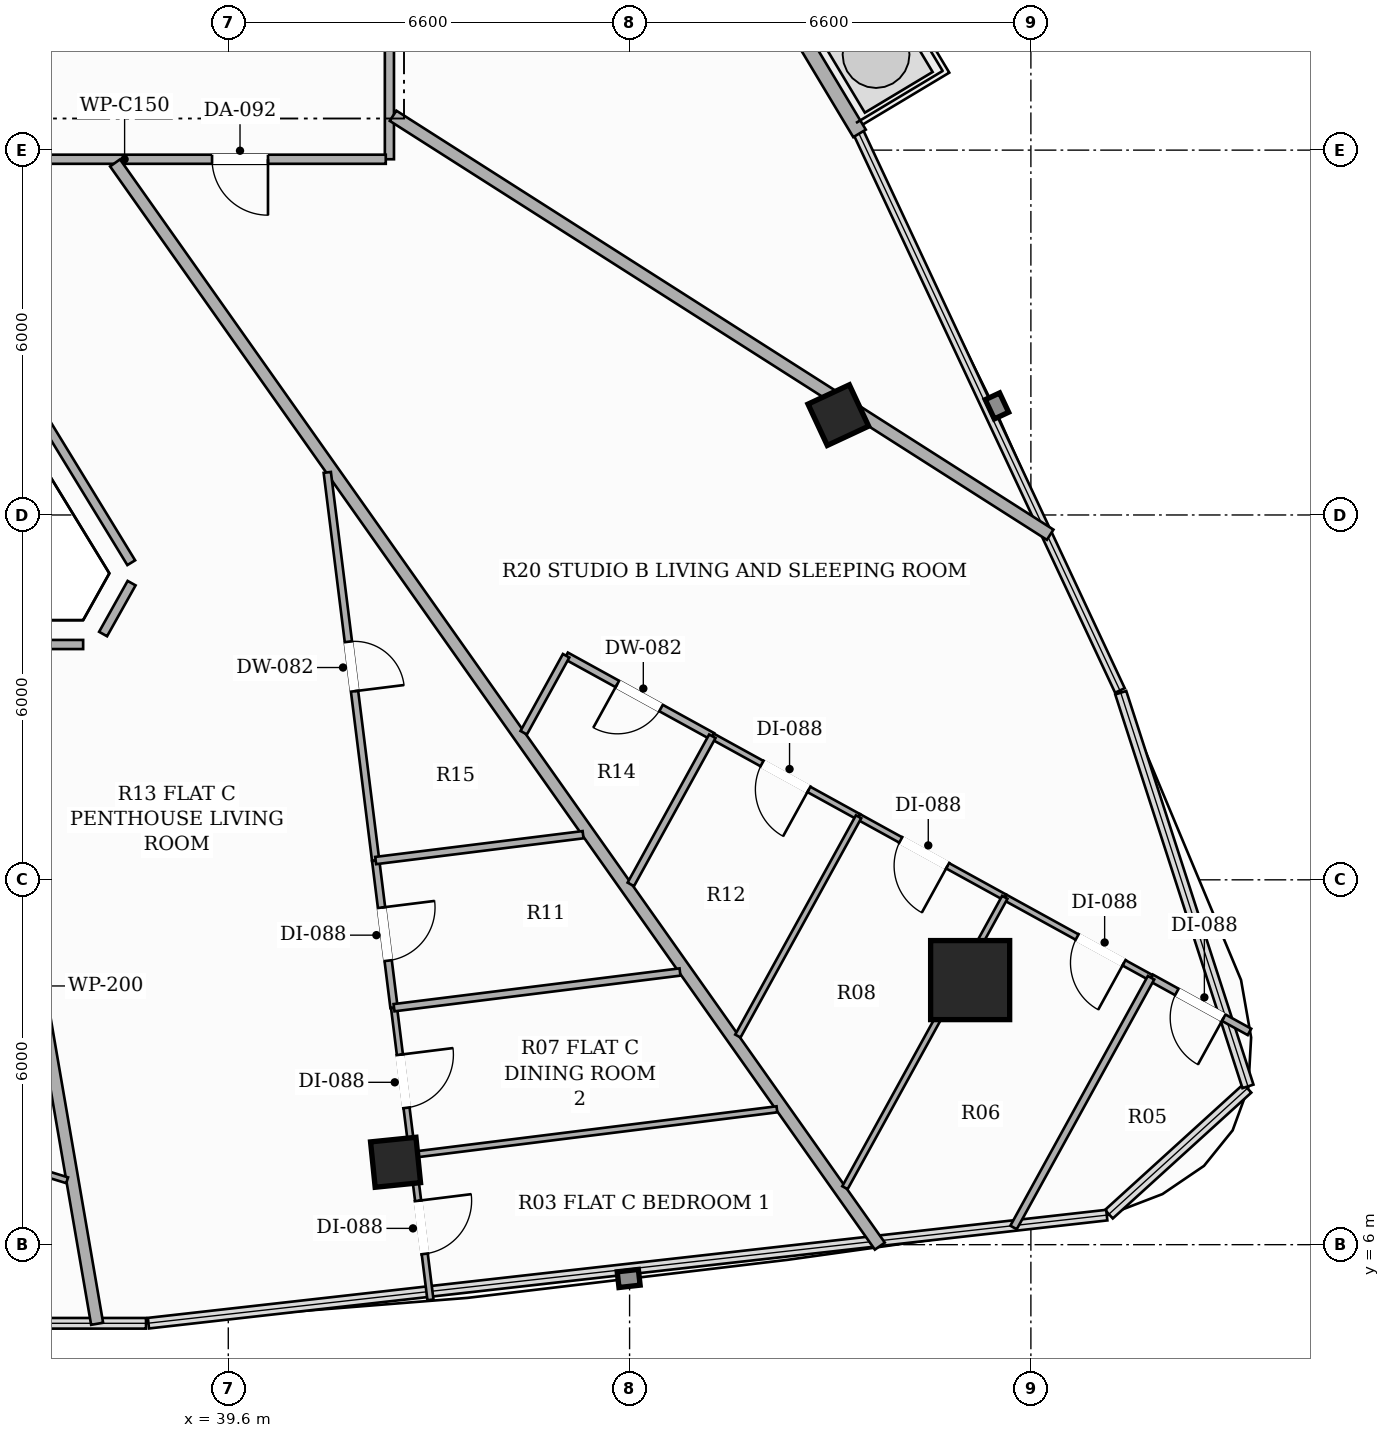
"""IFC4 building model, lengths in metres.
Left out: names, types, materials, properties, quantities, classifications, styles, units other than length and angle.
Written with IfcOpenShell. Run it as: python <this file> out.ifc"""

import sys

from ifc_helpers import new_model, si_unit, direction, frame, frame_2d, origin, origin_2d, place, context, subcontext, project, spatial, rectangle, hollow_rectangle, extrude, element, fill, save


model = new_model("IFC4")
c1 = context("Model", 3, precision=1e-05, world=origin(), true_north=direction((0.0, 1.0)))
c2 = subcontext(c1, "Body", "Model", "MODEL_VIEW")
j1 = project(units=[si_unit("LENGTHUNIT", "METRE"), si_unit("PLANEANGLEUNIT", "RADIAN")], contexts=[c1])
p1 = place(None, origin())
s1 = spatial("IfcSite", under=j1, at=p1, CompositionType="ELEMENT")
p2 = place(p1, origin())
s2 = spatial("IfcBuilding", under=s1, at=p2, CompositionType="ELEMENT")
p3 = place(p2, frame((0.0, 0.0, 206.3)))
s3 = spatial("IfcBuildingStorey", under=s2, at=p3, CompositionType="ELEMENT", Elevation=206.3)
p4 = place(p3, frame((51.801, 10.351, 0.0), z_axis=(0.0, 0.0, 1.0), x_axis=(1.0, 0.0, 0.0)))
e1 = element("IfcColumn", 1, at=p4, inside=s3, PredefinedType="COLUMN", context=c2, shape_type="SweptSolid", body=[
    extrude(hollow_rectangle(XDim=1.3, YDim=1.3, WallThickness=0.04, at=origin_2d()), origin(), (0.0, 0.0, 1.0), 3.3),
])
for number, where, z_axis, x_axis in (
    (2, (42.351, 7.355, 0.0), (0.0, 0.0, 1.0), (0.995, 0.101, 0.0)),
    (3, (49.633, 19.642, 0.0), (0.0, 0.0, 1.0), (-0.423, 0.906, 0.0)),
):
    element("IfcColumn", number, at=place(p3, frame(where, z_axis=z_axis, x_axis=x_axis)), inside=s3, PredefinedType="COLUMN", context=c2, shape_type="SweptSolid", body=[
        extrude(hollow_rectangle(XDim=0.75, YDim=0.75, WallThickness=0.025, at=origin_2d()), origin(), (0.0, 0.0, 1.0), 3.3),
    ])
p5 = place(p3, frame((49.982, 24.275, 0.0), z_axis=(0.0, 0.0, 1.0), x_axis=(-0.514391899557, 0.857555230682, 0.0)))
e4 = element("IfcWall", 4, at=p5, inside=s3, PredefinedType="SOLIDWALL", context=c2, shape_type="SweptSolid", body=[
    extrude(rectangle(XDim=10.371, YDim=0.24, at=frame_2d((5.186, 0.0))), origin(), (0.0, 0.0, 1.0), 2.624),
])
p6 = place(p5, frame((7.874, 0.0, 0.0)))
e5 = element("IfcOpeningElement", 5, at=p6, cuts=e4, PredefinedType="OPENING", context=c2, shape_type="SweptSolid", body=[
    extrude(rectangle(XDim=1.8, YDim=2.2, at=frame_2d((0.9, 1.1))), frame((0.0, 0.13, 0.0), z_axis=(0.0, -1.0, 0.0), x_axis=(1.0, 0.0, 0.0)), (0.0, 0.0, 1.0), 0.26),
])
p7 = place(p3, frame((42.25, 26.59, 0.0), z_axis=(0.0, 0.0, 1.0), x_axis=(0.0, -1.0, 0.0)))
e6 = element("IfcWall", 6, at=p7, inside=s3, PredefinedType="PARTITIONING", context=c2, shape_type="SweptSolid", body=[
    extrude(rectangle(XDim=2.74, YDim=0.15, at=frame_2d((1.37, 0.0))), origin(), (0.0, 0.0, 1.0), 2.773),
])
p8 = place(p3, frame((42.19, 23.85, 0.0), z_axis=(0.0, 0.0, 1.0), x_axis=(-1.0, 0.0, 0.0)))
e7 = element("IfcWall", 7, at=p8, inside=s3, PredefinedType="PARTITIONING", context=c2, shape_type="SweptSolid", body=[
    extrude(rectangle(XDim=8.24, YDim=0.15, at=frame_2d((4.12, 0.0))), origin(), (0.0, 0.0, 1.0), 2.565),
])
p9 = place(p8, frame((1.937, 0.0, 0.0)))
e8 = element("IfcOpeningElement", 8, at=p9, cuts=e7, PredefinedType="OPENING", context=c2, shape_type="SweptSolid", body=[
    extrude(rectangle(XDim=0.92, YDim=2.15, at=frame_2d((0.46, 1.075))), frame((0.0, 0.085, 0.0), z_axis=(0.0, -1.0, 0.0), x_axis=(1.0, 0.0, 0.0)), (0.0, 0.0, 1.0), 0.17),
])
p10 = place(p8, frame((5.733, 0.0, 0.0)))
e9 = element("IfcOpeningElement", 9, at=p10, cuts=e7, PredefinedType="OPENING", context=c2, shape_type="SweptSolid", body=[
    extrude(rectangle(XDim=0.92, YDim=2.15, at=frame_2d((0.46, 1.075))), frame((0.0, 0.085, 0.0), z_axis=(0.0, -1.0, 0.0), x_axis=(1.0, 0.0, 0.0)), (0.0, 0.0, 1.0), 0.17),
])
p11 = place(p3, frame((33.987, 23.79, 0.0), z_axis=(0.0, 0.0, 1.0), x_axis=(0.521338496894, -0.853349970209, 0.0)))
e10 = element("IfcWall", 10, at=p11, inside=s3, PredefinedType="PARTITIONING", context=c2, shape_type="SweptSolid", body=[
    extrude(rectangle(XDim=7.705, YDim=0.15, at=frame_2d((3.853, 0.0))), origin(), (0.0, 0.0, 1.0), 2.773),
])
p12 = place(p3, frame((38.01, 16.879, 0.0), z_axis=(0.0, 0.0, 1.0), x_axis=(-0.488859069364, -0.872362774481, 0.0)))
e11 = element("IfcWall", 11, at=p12, inside=s3, PredefinedType="PARTITIONING", context=c2, shape_type="SweptSolid", body=[
    extrude(rectangle(XDim=0.959, YDim=0.15, at=frame_2d((0.48, 0.0))), origin(), (0.0, 0.0, 1.0), 3.06),
])
p13 = place(p3, frame((37.213, 15.87, 0.0), z_axis=(0.0, 0.0, 1.0), x_axis=(-1.0, 0.0, 0.0)))
e12 = element("IfcWall", 12, at=p13, inside=s3, PredefinedType="PARTITIONING", context=c2, shape_type="SweptSolid", body=[
    extrude(rectangle(XDim=8.426, YDim=0.15, at=frame_2d((4.213, 0.0))), origin(), (0.0, 0.0, 1.0), 2.773),
])
p14 = place(p3, frame((35.53, 15.81, 0.0), z_axis=(0.0, 0.0, 1.0), x_axis=(0.169681394536, -0.985498972272, 0.0)))
e13 = element("IfcWall", 13, at=p14, inside=s3, PredefinedType="PARTITIONING", context=c2, shape_type="SweptSolid", body=[
    extrude(rectangle(XDim=11.275, YDim=0.2, at=frame_2d((5.637, 0.0))), origin(), (0.0, 0.0, 1.0), 2.492),
])
p15 = place(p3, frame((50.316, 5.976, 0.0), z_axis=(0.0, 0.0, 1.0), x_axis=(-0.576784728977, 0.816896184603, 0.0)))
e14 = element("IfcWall", 14, at=p15, inside=s3, PredefinedType="PARTITIONING", context=c2, shape_type="SweptSolid", body=[
    extrude(rectangle(XDim=21.807, YDim=0.2, at=frame_2d((10.903, 0.0))), origin(), (0.0, 0.0, 1.0), 2.492),
])
p16 = place(p3, frame((42.31, 24.565, 0.0), z_axis=(0.0, 0.0, 1.0), x_axis=(0.843209388644, -0.537585274075, 0.0)))
e15 = element("IfcWall", 15, at=p16, inside=s3, PredefinedType="PARTITIONING", context=c2, shape_type="SweptSolid", body=[
    extrude(rectangle(XDim=12.816, YDim=0.2, at=frame_2d((6.408, 0.0))), origin(), (0.0, 0.0, 1.0), 2.492),
])
p17 = place(p3, frame((29.459, 9.37, 0.0), z_axis=(0.0, 0.0, 1.0), x_axis=(0.955559226726, -0.294799193044, 0.0)))
e16 = element("IfcWall", 16, at=p17, inside=s3, PredefinedType="PARTITIONING", context=c2, shape_type="SweptSolid", body=[
    extrude(rectangle(XDim=7.839, YDim=0.1, at=frame_2d((3.92, 0.0))), origin(), (0.0, 0.0, 1.0), 2.492),
])
p18 = place(p3, frame((47.561, 14.361, 0.0), z_axis=(0.0, 0.0, 1.0), x_axis=(-0.876029965154, 0.482256674554, 0.0)))
e17 = element("IfcWall", 17, at=p18, inside=s3, PredefinedType="PARTITIONING", context=c2, shape_type="SweptSolid", body=[
    extrude(rectangle(XDim=2.745, YDim=0.12, at=frame_2d((1.373, 0.0))), origin(), (0.0, 0.0, 1.0), 3.06),
])
p19 = place(p18, frame((0.963, 0.0, 0.0)))
e18 = element("IfcOpeningElement", 18, at=p19, cuts=e17, PredefinedType="OPENING", context=c2, shape_type="SweptSolid", body=[
    extrude(rectangle(XDim=0.82, YDim=2.1, at=frame_2d((0.41, 1.05))), frame((0.0, 0.07, 0.0), z_axis=(0.0, -1.0, 0.0), x_axis=(1.0, 0.0, 0.0)), (0.0, 0.0, 1.0), 0.14),
])
p20 = place(p3, frame((45.156, 15.685, 0.0), z_axis=(0.0, 0.0, 1.0), x_axis=(-0.482268873401, -0.876023249548, 0.0)))
e19 = element("IfcWall", 19, at=p20, inside=s3, PredefinedType="PARTITIONING", context=c2, shape_type="SweptSolid", body=[
    extrude(rectangle(XDim=1.445, YDim=0.12, at=frame_2d((0.723, 0.0))), origin(), (0.0, 0.0, 1.0), 2.773),
])
p21 = place(p3, frame((56.395, 9.499, 0.0), z_axis=(0.0, 0.0, 1.0), x_axis=(-0.876137798995, 0.482060740128, 0.0)))
e20 = element("IfcWall", 20, at=p21, inside=s3, PredefinedType="PARTITIONING", context=c2, shape_type="SweptSolid", body=[
    extrude(rectangle(XDim=1.848, YDim=0.12, at=frame_2d((0.924, 0.0))), origin(), (0.0, 0.0, 1.0), 3.06),
])
p22 = place(p21, frame((0.484, 0.0, 0.0)))
e21 = element("IfcOpeningElement", 21, at=p22, cuts=e20, PredefinedType="OPENING", context=c2, shape_type="SweptSolid", body=[
    extrude(rectangle(XDim=0.88, YDim=2.1, at=frame_2d((0.44, 1.05))), frame((0.0, 0.07, 0.0), z_axis=(0.0, -1.0, 0.0), x_axis=(1.0, 0.0, 0.0)), (0.0, 0.0, 1.0), 0.14),
])
p23 = place(p3, frame((54.776, 10.39, 0.0), z_axis=(0.0, 0.0, 1.0), x_axis=(-0.876159561865, 0.48202118434, 0.0)))
e22 = element("IfcWall", 22, at=p23, inside=s3, PredefinedType="PARTITIONING", context=c2, shape_type="SweptSolid", body=[
    extrude(rectangle(XDim=2.745, YDim=0.1, at=frame_2d((1.372, 0.0))), origin(), (0.0, 0.0, 1.0), 3.06),
])
p24 = place(p23, frame((0.508, 0.0, 0.0)))
e23 = element("IfcOpeningElement", 23, at=p24, cuts=e22, PredefinedType="OPENING", context=c2, shape_type="SweptSolid", body=[
    extrude(rectangle(XDim=0.88, YDim=2.1, at=frame_2d((0.44, 1.05))), frame((0.0, 0.06, 0.0), z_axis=(0.0, -1.0, 0.0), x_axis=(1.0, 0.0, 0.0)), (0.0, 0.0, 1.0), 0.12),
])
p25 = place(p3, frame((52.371, 11.713, 0.0), z_axis=(0.0, 0.0, 1.0), x_axis=(-0.87599239457, 0.482324916064, 0.0)))
e24 = element("IfcWall", 24, at=p25, inside=s3, PredefinedType="PARTITIONING", context=c2, shape_type="SweptSolid", body=[
    extrude(rectangle(XDim=2.746, YDim=0.1, at=frame_2d((1.373, 0.0))), origin(), (0.0, 0.0, 1.0), 2.492),
])
p26 = place(p25, frame((1.074, 0.0, 0.0)))
e25 = element("IfcOpeningElement", 25, at=p26, cuts=e24, PredefinedType="OPENING", context=c2, shape_type="SweptSolid", body=[
    extrude(rectangle(XDim=0.88, YDim=2.1, at=frame_2d((0.44, 1.05))), frame((0.0, 0.06, 0.0), z_axis=(0.0, -1.0, 0.0), x_axis=(1.0, 0.0, 0.0)), (0.0, 0.0, 1.0), 0.12),
])
p27 = place(p3, frame((49.966, 13.037, 0.0), z_axis=(0.0, 0.0, 1.0), x_axis=(-0.876029965154, 0.482256674554, 0.0)))
e26 = element("IfcWall", 26, at=p27, inside=s3, PredefinedType="PARTITIONING", context=c2, shape_type="SweptSolid", body=[
    extrude(rectangle(XDim=2.745, YDim=0.1, at=frame_2d((1.373, 0.0))), origin(), (0.0, 0.0, 1.0), 2.565),
])
p28 = place(p27, frame((0.933, 0.0, 0.0)))
e27 = element("IfcOpeningElement", 27, at=p28, cuts=e26, PredefinedType="OPENING", context=c2, shape_type="SweptSolid", body=[
    extrude(rectangle(XDim=0.88, YDim=2.1, at=frame_2d((0.44, 1.05))), frame((0.0, 0.06, 0.0), z_axis=(0.0, -1.0, 0.0), x_axis=(1.0, 0.0, 0.0)), (0.0, 0.0, 1.0), 0.12),
])
p29 = place(p3, frame((47.561, 14.361, 0.0), z_axis=(0.0, 0.0, 1.0), x_axis=(-0.482262481374, -0.87602676846, 0.0)))
e28 = element("IfcWall", 28, at=p29, inside=s3, PredefinedType="PARTITIONING", context=c2, shape_type="SweptSolid", body=[
    extrude(rectangle(XDim=2.781, YDim=0.12, at=frame_2d((1.39, 0.0))), origin(), (0.0, 0.0, 1.0), 3.06),
])
p30 = place(p3, frame((52.515, 6.283, 0.0), z_axis=(0.0, 0.0, 1.0), x_axis=(0.482274545088, 0.876020127143, 0.0)))
e29 = element("IfcWall", 29, at=p30, inside=s3, PredefinedType="PARTITIONING", context=c2, shape_type="SweptSolid", body=[
    extrude(rectangle(XDim=4.688, YDim=0.12, at=frame_2d((2.344, 0.0))), origin(), (0.0, 0.0, 1.0), 3.06),
])
p31 = place(p3, frame((49.742, 6.937, 0.0), z_axis=(0.0, 0.0, 1.0), x_axis=(0.482259092216, 0.876028634221, 0.0)))
e30 = element("IfcWall", 30, at=p31, inside=s3, PredefinedType="PARTITIONING", context=c2, shape_type="SweptSolid", body=[
    extrude(rectangle(XDim=5.452, YDim=0.1, at=frame_2d((2.726, 0.0))), origin(), (0.0, 0.0, 1.0), 2.492),
])
p32 = place(p3, frame((47.981, 9.431, 0.0), z_axis=(0.0, 0.0, 1.0), x_axis=(0.482235180657, 0.876041797255, 0.0)))
e31 = element("IfcWall", 31, at=p32, inside=s3, PredefinedType="PARTITIONING", context=c2, shape_type="SweptSolid", body=[
    extrude(rectangle(XDim=4.116, YDim=0.1, at=frame_2d((2.058, 0.0))), origin(), (0.0, 0.0, 1.0), 2.492),
])
p33 = place(p3, frame((41.228, 18.7, 0.0), z_axis=(0.0, 0.0, 1.0), x_axis=(0.123731094195, -0.992315784581, 0.0)))
e32 = element("IfcWall", 32, at=p33, inside=s3, PredefinedType="PARTITIONING", context=c2, shape_type="SweptSolid", body=[
    extrude(rectangle(XDim=6.432, YDim=0.12, at=frame_2d((3.216, 0.0))), origin(), (0.0, 0.0, 1.0), 3.06),
])
p34 = place(p33, frame((2.806, 0.0, 0.0)))
e33 = element("IfcOpeningElement", 33, at=p34, cuts=e32, PredefinedType="OPENING", context=c2, shape_type="SweptSolid", body=[
    extrude(rectangle(XDim=0.82, YDim=2.1, at=frame_2d((0.41, 1.05))), frame((0.0, 0.07, 0.0), z_axis=(0.0, -1.0, 0.0), x_axis=(1.0, 0.0, 0.0)), (0.0, 0.0, 1.0), 0.14),
])
p35 = place(p3, frame((42.024, 12.317, 0.0), z_axis=(0.0, 0.0, 1.0), x_axis=(0.123837590029, -0.992302499894, 0.0)))
e34 = element("IfcWall", 34, at=p35, inside=s3, PredefinedType="PARTITIONING", context=c2, shape_type="SweptSolid", body=[
    extrude(rectangle(XDim=2.439, YDim=0.12, at=frame_2d((1.219, 0.0))), origin(), (0.0, 0.0, 1.0), 3.06),
])
p36 = place(p35, frame((0.779, 0.0, 0.0)))
e35 = element("IfcOpeningElement", 35, at=p36, cuts=e34, PredefinedType="OPENING", context=c2, shape_type="SweptSolid", body=[
    extrude(rectangle(XDim=0.88, YDim=2.1, at=frame_2d((0.44, 1.05))), frame((0.0, 0.07, 0.0), z_axis=(0.0, -1.0, 0.0), x_axis=(1.0, 0.0, 0.0)), (0.0, 0.0, 1.0), 0.14),
])
p37 = place(p3, frame((42.628, 7.478, 0.0), z_axis=(0.0, 0.0, 1.0), x_axis=(0.123572330504, -0.992335567806, 0.0)))
e36 = element("IfcWall", 36, at=p37, inside=s3, PredefinedType="PARTITIONING", context=c2, shape_type="SweptSolid", body=[
    extrude(rectangle(XDim=2.404, YDim=0.1, at=frame_2d((1.202, 0.0))), origin(), (0.0, 0.0, 1.0), 2.492),
])
p38 = place(p37, frame((0.762, 0.0, 0.0)))
e37 = element("IfcOpeningElement", 37, at=p38, cuts=e36, PredefinedType="OPENING", context=c2, shape_type="SweptSolid", body=[
    extrude(rectangle(XDim=0.88, YDim=2.1, at=frame_2d((0.44, 1.05))), frame((0.0, 0.06, 0.0), z_axis=(0.0, -1.0, 0.0), x_axis=(1.0, 0.0, 0.0)), (0.0, 0.0, 1.0), 0.12),
])
p39 = place(p3, frame((42.326, 9.897, 0.0), z_axis=(0.0, 0.0, 1.0), x_axis=(0.123886817851, -0.992296355109, 0.0)))
e38 = element("IfcWall", 38, at=p39, inside=s3, PredefinedType="PARTITIONING", context=c2, shape_type="SweptSolid", body=[
    extrude(rectangle(XDim=2.438, YDim=0.1, at=frame_2d((1.219, 0.0))), origin(), (0.0, 0.0, 1.0), 2.492),
])
p40 = place(p39, frame((0.779, 0.0, 0.0)))
e39 = element("IfcOpeningElement", 39, at=p40, cuts=e38, PredefinedType="OPENING", context=c2, shape_type="SweptSolid", body=[
    extrude(rectangle(XDim=0.88, YDim=2.1, at=frame_2d((0.44, 1.05))), frame((0.0, 0.06, 0.0), z_axis=(0.0, -1.0, 0.0), x_axis=(1.0, 0.0, 0.0)), (0.0, 0.0, 1.0), 0.12),
])
p41 = place(p3, frame((45.435, 12.742, 0.0), z_axis=(0.0, 0.0, 1.0), x_axis=(-0.99232587892, -0.123650111308, 0.0)))
e40 = element("IfcWall", 40, at=p41, inside=s3, PredefinedType="PARTITIONING", context=c2, shape_type="SweptSolid", body=[
    extrude(rectangle(XDim=3.438, YDim=0.12, at=frame_2d((1.719, 0.0))), origin(), (0.0, 0.0, 1.0), 2.773),
])
p42 = place(p3, frame((47.029, 10.484, 0.0), z_axis=(0.0, 0.0, 1.0), x_axis=(-0.992303215116, -0.123831858863, 0.0)))
e41 = element("IfcWall", 41, at=p42, inside=s3, PredefinedType="PARTITIONING", context=c2, shape_type="SweptSolid", body=[
    extrude(rectangle(XDim=4.74, YDim=0.12, at=frame_2d((2.37, 0.0))), origin(), (0.0, 0.0, 1.0), 2.773),
])
p43 = place(p3, frame((42.628, 7.478, 0.0), z_axis=(0.0, 0.0, 1.0), x_axis=(0.992305206969, 0.123815896488, 0.0)))
e42 = element("IfcWall", 42, at=p43, inside=s3, PredefinedType="PARTITIONING", context=c2, shape_type="SweptSolid", body=[
    extrude(rectangle(XDim=6.042, YDim=0.1, at=frame_2d((3.021, 0.0))), origin(), (0.0, 0.0, 1.0), 2.492),
])
p44 = place(p9, origin())
e43 = element("IfcDoor", 43, at=p44, inside=s3, OperationType="SINGLE_SWING_LEFT", PredefinedType="DOOR", context=c2, shape_type="SweptSolid", body=[
    extrude(rectangle(XDim=0.92, YDim=2.15, at=frame_2d((0.46, 1.075))), frame((0.0, 0.025, 0.0), z_axis=(0.0, -1.0, 0.0), x_axis=(1.0, 0.0, 0.0)), (0.0, 0.0, 1.0), 0.05),
])
fill(e8, e43)
p45 = place(p19, origin())
e44 = element("IfcDoor", 44, at=p45, inside=s3, OperationType="SINGLE_SWING_RIGHT", PredefinedType="DOOR", context=c2, shape_type="SweptSolid", body=[
    extrude(rectangle(XDim=0.82, YDim=2.1, at=frame_2d((0.41, 1.05))), frame((0.0, 0.025, 0.0), z_axis=(0.0, -1.0, 0.0), x_axis=(1.0, 0.0, 0.0)), (0.0, 0.0, 1.0), 0.05),
])
fill(e18, e44)
p46 = place(p22, origin())
e45 = element("IfcDoor", 45, at=p46, inside=s3, OperationType="SINGLE_SWING_LEFT", PredefinedType="DOOR", context=c2, shape_type="SweptSolid", body=[
    extrude(rectangle(XDim=0.88, YDim=2.1, at=frame_2d((0.44, 1.05))), frame((0.0, 0.025, 0.0), z_axis=(0.0, -1.0, 0.0), x_axis=(1.0, 0.0, 0.0)), (0.0, 0.0, 1.0), 0.05),
])
fill(e21, e45)
p47 = place(p24, origin())
e46 = element("IfcDoor", 46, at=p47, inside=s3, OperationType="SINGLE_SWING_LEFT", PredefinedType="DOOR", context=c2, shape_type="SweptSolid", body=[
    extrude(rectangle(XDim=0.88, YDim=2.1, at=frame_2d((0.44, 1.05))), frame((0.0, 0.025, 0.0), z_axis=(0.0, -1.0, 0.0), x_axis=(1.0, 0.0, 0.0)), (0.0, 0.0, 1.0), 0.05),
])
fill(e23, e46)
p48 = place(p26, origin())
e47 = element("IfcDoor", 47, at=p48, inside=s3, OperationType="SINGLE_SWING_LEFT", PredefinedType="DOOR", context=c2, shape_type="SweptSolid", body=[
    extrude(rectangle(XDim=0.88, YDim=2.1, at=frame_2d((0.44, 1.05))), frame((0.0, 0.025, 0.0), z_axis=(0.0, -1.0, 0.0), x_axis=(1.0, 0.0, 0.0)), (0.0, 0.0, 1.0), 0.05),
])
fill(e25, e47)
p49 = place(p28, origin())
e48 = element("IfcDoor", 48, at=p49, inside=s3, OperationType="SINGLE_SWING_LEFT", PredefinedType="DOOR", context=c2, shape_type="SweptSolid", body=[
    extrude(rectangle(XDim=0.88, YDim=2.1, at=frame_2d((0.44, 1.05))), frame((0.0, 0.025, 0.0), z_axis=(0.0, -1.0, 0.0), x_axis=(1.0, 0.0, 0.0)), (0.0, 0.0, 1.0), 0.05),
])
fill(e27, e48)
p50 = place(p34, origin())
e49 = element("IfcDoor", 49, at=p50, inside=s3, OperationType="SINGLE_SWING_RIGHT", PredefinedType="DOOR", context=c2, shape_type="SweptSolid", body=[
    extrude(rectangle(XDim=0.82, YDim=2.1, at=frame_2d((0.41, 1.05))), frame((0.0, 0.025, 0.0), z_axis=(0.0, -1.0, 0.0), x_axis=(1.0, 0.0, 0.0)), (0.0, 0.0, 1.0), 0.05),
])
fill(e33, e49)
p51 = place(p36, origin())
e50 = element("IfcDoor", 50, at=p51, inside=s3, OperationType="SINGLE_SWING_LEFT", PredefinedType="DOOR", context=c2, shape_type="SweptSolid", body=[
    extrude(rectangle(XDim=0.88, YDim=2.1, at=frame_2d((0.44, 1.05))), frame((0.0, 0.025, 0.0), z_axis=(0.0, -1.0, 0.0), x_axis=(1.0, 0.0, 0.0)), (0.0, 0.0, 1.0), 0.05),
])
fill(e35, e50)
p52 = place(p38, origin())
e51 = element("IfcDoor", 51, at=p52, inside=s3, OperationType="SINGLE_SWING_LEFT", PredefinedType="DOOR", context=c2, shape_type="SweptSolid", body=[
    extrude(rectangle(XDim=0.88, YDim=2.1, at=frame_2d((0.44, 1.05))), frame((0.0, 0.025, 0.0), z_axis=(0.0, -1.0, 0.0), x_axis=(1.0, 0.0, 0.0)), (0.0, 0.0, 1.0), 0.05),
])
fill(e37, e51)
p53 = place(p40, origin())
e52 = element("IfcDoor", 52, at=p53, inside=s3, OperationType="SINGLE_SWING_LEFT", PredefinedType="DOOR", context=c2, shape_type="SweptSolid", body=[
    extrude(rectangle(XDim=0.88, YDim=2.1, at=frame_2d((0.44, 1.05))), frame((0.0, 0.025, 0.0), z_axis=(0.0, -1.0, 0.0), x_axis=(1.0, 0.0, 0.0)), (0.0, 0.0, 1.0), 0.05),
])
fill(e39, e52)
save(model, sys.argv[1])
